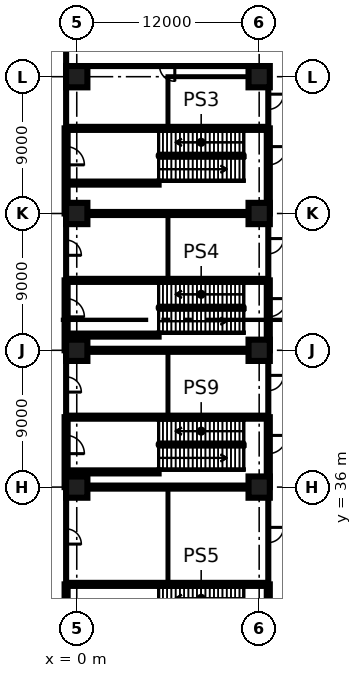
"""IFC4 building model, lengths in metres.
Left out: names, types, materials, properties, quantities, classifications, styles, units other than length and angle.
Written with IfcOpenShell. Run it as: python <this file> out.ifc"""

import sys

from ifc_helpers import new_model, si_unit, direction, frame, frame_2d, origin, origin_2d, place, context, subcontext, project, spatial, rectangle, extrude, element, fill, save


model = new_model("IFC4")
c1 = context("Model", 3, precision=1e-05, world=origin(), true_north=direction((0.0, 1.0)))
c2 = subcontext(c1, "Body", "Model", "MODEL_VIEW")
j1 = project(units=[si_unit("LENGTHUNIT", "METRE"), si_unit("PLANEANGLEUNIT", "RADIAN")], contexts=[c1])
p1 = place(None, origin())
s1 = spatial("IfcSite", under=j1, at=p1, CompositionType="ELEMENT")
p2 = place(p1, origin())
s2 = spatial("IfcBuilding", under=s1, at=p2, CompositionType="ELEMENT")
p3 = place(p2, origin())
s3 = spatial("IfcBuildingStorey", under=s2, at=p3, CompositionType="ELEMENT", Elevation=0.0)
for number, where, z_axis, x_axis in (
    (1, (0.0, 36.0, 0.0), (0.0, 0.0, 1.0), (1.0, 0.0, 0.0)),
    (2, (12.0, 36.0, 0.0), (0.0, 0.0, 1.0), (1.0, 0.0, 0.0)),
    (3, (0.0, 45.0, 0.0), (0.0, 0.0, 1.0), (1.0, 0.0, 0.0)),
    (4, (12.0, 45.0, 0.0), (0.0, 0.0, 1.0), (1.0, 0.0, 0.0)),
    (5, (0.0, 54.0, 0.0), (0.0, 0.0, 1.0), (1.0, 0.0, 0.0)),
    (6, (12.0, 54.0, 0.0), (0.0, 0.0, 1.0), (1.0, 0.0, 0.0)),
    (7, (0.0, 63.0, 0.0), (0.0, 0.0, 1.0), (1.0, 0.0, 0.0)),
    (8, (12.0, 63.0, 0.0), (0.0, 0.0, 1.0), (1.0, 0.0, 0.0)),
):
    element("IfcColumn", number, at=place(p3, frame(where, z_axis=z_axis, x_axis=x_axis)), inside=s3, PredefinedType="COLUMN", context=c2, shape_type="SweptSolid", body=[
        extrude(rectangle(XDim=1.4, YDim=1.4, at=origin_2d()), origin(), (0.0, 0.0, 1.0), 7.2),
    ])
p4 = place(p3, frame((-0.7, 23.0, 0.0), z_axis=(0.0, 0.0, 1.0), x_axis=(0.0, 1.0, 0.0)))
e9 = element("IfcWall", 9, at=p4, inside=s3, PredefinedType="SOLIDWALL", context=c2, shape_type="SweptSolid", body=[
    extrude(rectangle(XDim=6.6, YDim=0.2, at=frame_2d((3.3, 0.0))), origin(), (0.0, 0.0, 1.0), 6.8),
])
p5 = place(p4, frame((4.2, 0.0, 0.0)))
e10 = element("IfcOpeningElement", 10, at=p5, cuts=e9, PredefinedType="OPENING", context=c2, shape_type="SweptSolid", body=[
    extrude(rectangle(XDim=1.2, YDim=2.1, at=frame_2d((0.6, 1.05))), frame((0.0, 0.11, 0.0), z_axis=(0.0, -1.0, 0.0), x_axis=(1.0, 0.0, 0.0)), (0.0, 0.0, 1.0), 0.22),
])
p6 = place(p3, frame((-0.7, 29.6, 0.0), z_axis=(0.0, 0.0, 1.0), x_axis=(0.0, 1.0, 0.0)))
e11 = element("IfcWall", 11, at=p6, inside=s3, PredefinedType="PARTITIONING", context=c2, shape_type="SweptSolid", body=[
    extrude(rectangle(XDim=6.4, YDim=0.2, at=frame_2d((3.2, 0.0))), origin(), (0.0, 0.0, 1.0), 6.8),
])
p7 = place(p6, frame((2.65, 0.0, 0.0)))
e12 = element("IfcOpeningElement", 12, at=p7, cuts=e11, PredefinedType="OPENING", context=c2, shape_type="SweptSolid", body=[
    extrude(rectangle(XDim=1.0, YDim=2.1, at=frame_2d((0.5, 1.05))), frame((0.0, 0.11, 0.0), z_axis=(0.0, -1.0, 0.0), x_axis=(1.0, 0.0, 0.0)), (0.0, 0.0, 1.0), 0.22),
])
p8 = place(p3, frame((-0.7, 36.0, 0.0), z_axis=(0.0, 0.0, 1.0), x_axis=(0.0, 1.0, 0.0)))
e13 = element("IfcWall", 13, at=p8, inside=s3, PredefinedType="SOLIDWALL", context=c2, shape_type="SweptSolid", body=[
    extrude(rectangle(XDim=4.6, YDim=0.2, at=frame_2d((2.3, 0.0))), origin(), (0.0, 0.0, 1.0), 6.8),
])
p9 = place(p8, frame((2.2, 0.0, 0.0)))
e14 = element("IfcOpeningElement", 14, at=p9, cuts=e13, PredefinedType="OPENING", context=c2, shape_type="SweptSolid", body=[
    extrude(rectangle(XDim=1.2, YDim=2.1, at=frame_2d((0.6, 1.05))), frame((0.0, 0.11, 0.0), z_axis=(0.0, -1.0, 0.0), x_axis=(1.0, 0.0, 0.0)), (0.0, 0.0, 1.0), 0.22),
])
p10 = place(p3, frame((-0.7, 40.6, 0.0), z_axis=(0.0, 0.0, 1.0), x_axis=(0.0, 1.0, 0.0)))
e15 = element("IfcWall", 15, at=p10, inside=s3, PredefinedType="PARTITIONING", context=c2, shape_type="SweptSolid", body=[
    extrude(rectangle(XDim=4.4, YDim=0.2, at=frame_2d((2.2, 0.0))), origin(), (0.0, 0.0, 1.0), 6.8),
])
p11 = place(p10, frame((1.65, 0.0, 0.0)))
e16 = element("IfcOpeningElement", 16, at=p11, cuts=e15, PredefinedType="OPENING", context=c2, shape_type="SweptSolid", body=[
    extrude(rectangle(XDim=1.0, YDim=2.1, at=frame_2d((0.5, 1.05))), frame((0.0, 0.11, 0.0), z_axis=(0.0, -1.0, 0.0), x_axis=(1.0, 0.0, 0.0)), (0.0, 0.0, 1.0), 0.22),
])
p12 = place(p3, frame((-0.7, 45.0, 0.0), z_axis=(0.0, 0.0, 1.0), x_axis=(0.0, 1.0, 0.0)))
e17 = element("IfcWall", 17, at=p12, inside=s3, PredefinedType="SOLIDWALL", context=c2, shape_type="SweptSolid", body=[
    extrude(rectangle(XDim=4.6, YDim=0.2, at=frame_2d((2.3, 0.0))), origin(), (0.0, 0.0, 1.0), 6.8),
])
p13 = place(p12, frame((2.2, 0.0, 0.0)))
e18 = element("IfcOpeningElement", 18, at=p13, cuts=e17, PredefinedType="OPENING", context=c2, shape_type="SweptSolid", body=[
    extrude(rectangle(XDim=1.2, YDim=2.1, at=frame_2d((0.6, 1.05))), frame((0.0, 0.11, 0.0), z_axis=(0.0, -1.0, 0.0), x_axis=(1.0, 0.0, 0.0)), (0.0, 0.0, 1.0), 0.22),
])
p14 = place(p3, frame((-0.7, 49.6, 0.0), z_axis=(0.0, 0.0, 1.0), x_axis=(0.0, 1.0, 0.0)))
e19 = element("IfcWall", 19, at=p14, inside=s3, PredefinedType="PARTITIONING", context=c2, shape_type="SweptSolid", body=[
    extrude(rectangle(XDim=4.4, YDim=0.2, at=frame_2d((2.2, 0.0))), origin(), (0.0, 0.0, 1.0), 6.8),
])
p15 = place(p14, frame((1.65, 0.0, 0.0)))
e20 = element("IfcOpeningElement", 20, at=p15, cuts=e19, PredefinedType="OPENING", context=c2, shape_type="SweptSolid", body=[
    extrude(rectangle(XDim=1.0, YDim=2.1, at=frame_2d((0.5, 1.05))), frame((0.0, 0.11, 0.0), z_axis=(0.0, -1.0, 0.0), x_axis=(1.0, 0.0, 0.0)), (0.0, 0.0, 1.0), 0.22),
])
p16 = place(p3, frame((-0.7, 54.0, 0.0), z_axis=(0.0, 0.0, 1.0), x_axis=(0.0, 1.0, 0.0)))
e21 = element("IfcWall", 21, at=p16, inside=s3, PredefinedType="SOLIDWALL", context=c2, shape_type="SweptSolid", body=[
    extrude(rectangle(XDim=5.6, YDim=0.2, at=frame_2d((2.8, 0.0))), origin(), (0.0, 0.0, 1.0), 6.8),
])
p17 = place(p16, frame((3.2, 0.0, 0.0)))
e22 = element("IfcOpeningElement", 22, at=p17, cuts=e21, PredefinedType="OPENING", context=c2, shape_type="SweptSolid", body=[
    extrude(rectangle(XDim=1.2, YDim=2.1, at=frame_2d((0.6, 1.05))), frame((0.0, 0.11, 0.0), z_axis=(0.0, -1.0, 0.0), x_axis=(1.0, 0.0, 0.0)), (0.0, 0.0, 1.0), 0.22),
])
p18 = place(p3, frame((-0.7, 59.6, 0.0), z_axis=(0.0, 0.0, 1.0), x_axis=(0.0, 1.0, 0.0)))
e23 = element("IfcWall", 23, at=p18, inside=s3, PredefinedType="PARTITIONING", context=c2, shape_type="SweptSolid", body=[
    extrude(rectangle(XDim=6.4, YDim=0.2, at=frame_2d((3.2, 0.0))), origin(), (0.0, 0.0, 1.0), 6.8),
])
for number, where, z_axis, x_axis in (
    (24, (-0.6, 29.6, 0.0), (0.0, 0.0, 1.0), (1.0, 0.0, 0.0)),
    (25, (-0.6, 36.0, 0.0), (0.0, 0.0, 1.0), (1.0, 0.0, 0.0)),
    (26, (-0.6, 40.6, 0.0), (0.0, 0.0, 1.0), (1.0, 0.0, 0.0)),
    (27, (-0.6, 45.0, 0.0), (0.0, 0.0, 1.0), (1.0, 0.0, 0.0)),
    (28, (-0.6, 49.6, 0.0), (0.0, 0.0, 1.0), (1.0, 0.0, 0.0)),
    (29, (-0.6, 54.0, 0.0), (0.0, 0.0, 1.0), (1.0, 0.0, 0.0)),
    (30, (-0.6, 59.6, 0.0), (0.0, 0.0, 1.0), (1.0, 0.0, 0.0)),
):
    element("IfcWall", number, at=place(p3, frame(where, z_axis=z_axis, x_axis=x_axis)), inside=s3, PredefinedType="SOLIDWALL", context=c2, shape_type="SweptSolid", body=[
        extrude(rectangle(XDim=13.1, YDim=0.2, at=frame_2d((6.55, 0.0))), origin(), (0.0, 0.0, 1.0), 6.8),
    ])
p19 = place(p3, frame((-0.6, 63.7, 0.0), z_axis=(0.0, 0.0, 1.0), x_axis=(1.0, 0.0, 0.0)))
e31 = element("IfcWall", 31, at=p19, inside=s3, PredefinedType="PARTITIONING", context=c2, shape_type="SweptSolid", body=[
    extrude(rectangle(XDim=13.3, YDim=0.2, at=frame_2d((6.65, 0.0))), origin(), (0.0, 0.0, 1.0), 6.8),
])
p20 = place(p19, frame((6.05, 0.0, 0.0)))
e32 = element("IfcOpeningElement", 32, at=p20, cuts=e31, PredefinedType="OPENING", context=c2, shape_type="SweptSolid", body=[
    extrude(rectangle(XDim=1.0, YDim=2.1, at=frame_2d((0.5, 1.05))), frame((0.0, 0.11, 0.0), z_axis=(0.0, -1.0, 0.0), x_axis=(1.0, 0.0, 0.0)), (0.0, 0.0, 1.0), 0.22),
])
p21 = place(p3, frame((5.938, 63.0, 0.0), z_axis=(0.0, 0.0, 1.0), x_axis=(1.0, 0.0, 0.0)))
e33 = element("IfcWall", 33, at=p21, inside=s3, PredefinedType="PARTITIONING", context=c2, shape_type="SweptSolid", body=[
    extrude(rectangle(XDim=6.562, YDim=0.125, at=frame_2d((3.281, 0.0))), origin(), (0.0, 0.0, 1.0), 6.8),
])
p22 = place(p3, frame((6.0, 29.7, 0.0), z_axis=(0.0, 0.0, 1.0), x_axis=(0.0, 1.0, 0.0)))
e34 = element("IfcWall", 34, at=p22, inside=s3, PredefinedType="PARTITIONING", context=c2, shape_type="SweptSolid", body=[
    extrude(rectangle(XDim=6.2, YDim=0.125, at=frame_2d((3.1, 0.0))), origin(), (0.0, 0.0, 1.0), 6.8),
])
for number, where, z_axis, x_axis in (
    (35, (6.0, 40.7, 0.0), (0.0, 0.0, 1.0), (0.0, 1.0, 0.0)),
    (36, (6.0, 49.7, 0.0), (0.0, 0.0, 1.0), (0.0, 1.0, 0.0)),
):
    element("IfcWall", number, at=place(p3, frame(where, z_axis=z_axis, x_axis=x_axis)), inside=s3, PredefinedType="PARTITIONING", context=c2, shape_type="SweptSolid", body=[
        extrude(rectangle(XDim=4.2, YDim=0.125, at=frame_2d((2.1, 0.0))), origin(), (0.0, 0.0, 1.0), 6.8),
    ])
p23 = place(p3, frame((6.0, 59.7, 0.0), z_axis=(0.0, 0.0, 1.0), x_axis=(0.0, 1.0, 0.0)))
e37 = element("IfcWall", 37, at=p23, inside=s3, PredefinedType="PARTITIONING", context=c2, shape_type="SweptSolid", body=[
    extrude(rectangle(XDim=3.238, YDim=0.125, at=frame_2d((1.619, 0.0))), origin(), (0.0, 0.0, 1.0), 6.8),
])
p24 = place(p3, frame((12.6, 23.1, 0.0), z_axis=(0.0, 0.0, 1.0), x_axis=(0.0, 1.0, 0.0)))
e38 = element("IfcWall", 38, at=p24, inside=s3, PredefinedType="SOLIDWALL", context=c2, shape_type="SweptSolid", body=[
    extrude(rectangle(XDim=6.5, YDim=0.2, at=frame_2d((3.25, 0.0))), origin(), (0.0, 0.0, 1.0), 6.8),
])
p25 = place(p24, frame((4.1, 0.0, 0.0)))
e39 = element("IfcOpeningElement", 39, at=p25, cuts=e38, PredefinedType="OPENING", context=c2, shape_type="SweptSolid", body=[
    extrude(rectangle(XDim=1.2, YDim=2.1, at=frame_2d((0.6, 1.05))), frame((0.0, 0.11, 0.0), z_axis=(0.0, -1.0, 0.0), x_axis=(1.0, 0.0, 0.0)), (0.0, 0.0, 1.0), 0.22),
])
p26 = place(p3, frame((12.6, 29.6, 0.0), z_axis=(0.0, 0.0, 1.0), x_axis=(0.0, 1.0, 0.0)))
e40 = element("IfcWall", 40, at=p26, inside=s3, PredefinedType="PARTITIONING", context=c2, shape_type="SweptSolid", body=[
    extrude(rectangle(XDim=6.4, YDim=0.2, at=frame_2d((3.2, 0.0))), origin(), (0.0, 0.0, 1.0), 6.8),
])
p27 = place(p26, frame((2.75, 0.0, 0.0)))
e41 = element("IfcOpeningElement", 41, at=p27, cuts=e40, PredefinedType="OPENING", context=c2, shape_type="SweptSolid", body=[
    extrude(rectangle(XDim=1.0, YDim=2.1, at=frame_2d((0.5, 1.05))), frame((0.0, 0.11, 0.0), z_axis=(0.0, -1.0, 0.0), x_axis=(1.0, 0.0, 0.0)), (0.0, 0.0, 1.0), 0.22),
])
p28 = place(p3, frame((12.6, 36.0, 0.0), z_axis=(0.0, 0.0, 1.0), x_axis=(0.0, 1.0, 0.0)))
e42 = element("IfcWall", 42, at=p28, inside=s3, PredefinedType="SOLIDWALL", context=c2, shape_type="SweptSolid", body=[
    extrude(rectangle(XDim=4.6, YDim=0.2, at=frame_2d((2.3, 0.0))), origin(), (0.0, 0.0, 1.0), 6.8),
])
p29 = place(p28, frame((2.2, 0.0, 0.0)))
e43 = element("IfcOpeningElement", 43, at=p29, cuts=e42, PredefinedType="OPENING", context=c2, shape_type="SweptSolid", body=[
    extrude(rectangle(XDim=1.2, YDim=2.1, at=frame_2d((0.6, 1.05))), frame((0.0, 0.11, 0.0), z_axis=(0.0, -1.0, 0.0), x_axis=(1.0, 0.0, 0.0)), (0.0, 0.0, 1.0), 0.22),
])
p30 = place(p3, frame((12.6, 40.6, 0.0), z_axis=(0.0, 0.0, 1.0), x_axis=(0.0, 1.0, 0.0)))
e44 = element("IfcWall", 44, at=p30, inside=s3, PredefinedType="PARTITIONING", context=c2, shape_type="SweptSolid", body=[
    extrude(rectangle(XDim=4.4, YDim=0.2, at=frame_2d((2.2, 0.0))), origin(), (0.0, 0.0, 1.0), 6.8),
])
p31 = place(p30, frame((1.75, 0.0, 0.0)))
e45 = element("IfcOpeningElement", 45, at=p31, cuts=e44, PredefinedType="OPENING", context=c2, shape_type="SweptSolid", body=[
    extrude(rectangle(XDim=1.0, YDim=2.1, at=frame_2d((0.5, 1.05))), frame((0.0, 0.11, 0.0), z_axis=(0.0, -1.0, 0.0), x_axis=(1.0, 0.0, 0.0)), (0.0, 0.0, 1.0), 0.22),
])
p32 = place(p3, frame((12.6, 45.0, 0.0), z_axis=(0.0, 0.0, 1.0), x_axis=(0.0, 1.0, 0.0)))
e46 = element("IfcWall", 46, at=p32, inside=s3, PredefinedType="SOLIDWALL", context=c2, shape_type="SweptSolid", body=[
    extrude(rectangle(XDim=4.6, YDim=0.2, at=frame_2d((2.3, 0.0))), origin(), (0.0, 0.0, 1.0), 6.8),
])
p33 = place(p32, frame((2.2, 0.0, 0.0)))
e47 = element("IfcOpeningElement", 47, at=p33, cuts=e46, PredefinedType="OPENING", context=c2, shape_type="SweptSolid", body=[
    extrude(rectangle(XDim=1.2, YDim=2.1, at=frame_2d((0.6, 1.05))), frame((0.0, 0.11, 0.0), z_axis=(0.0, -1.0, 0.0), x_axis=(1.0, 0.0, 0.0)), (0.0, 0.0, 1.0), 0.22),
])
p34 = place(p3, frame((12.6, 49.6, 0.0), z_axis=(0.0, 0.0, 1.0), x_axis=(0.0, 1.0, 0.0)))
e48 = element("IfcWall", 48, at=p34, inside=s3, PredefinedType="PARTITIONING", context=c2, shape_type="SweptSolid", body=[
    extrude(rectangle(XDim=4.4, YDim=0.2, at=frame_2d((2.2, 0.0))), origin(), (0.0, 0.0, 1.0), 6.8),
])
p35 = place(p34, frame((1.75, 0.0, 0.0)))
e49 = element("IfcOpeningElement", 49, at=p35, cuts=e48, PredefinedType="OPENING", context=c2, shape_type="SweptSolid", body=[
    extrude(rectangle(XDim=1.0, YDim=2.1, at=frame_2d((0.5, 1.05))), frame((0.0, 0.11, 0.0), z_axis=(0.0, -1.0, 0.0), x_axis=(1.0, 0.0, 0.0)), (0.0, 0.0, 1.0), 0.22),
])
p36 = place(p3, frame((12.6, 54.0, 0.0), z_axis=(0.0, 0.0, 1.0), x_axis=(0.0, 1.0, 0.0)))
e50 = element("IfcWall", 50, at=p36, inside=s3, PredefinedType="SOLIDWALL", context=c2, shape_type="SweptSolid", body=[
    extrude(rectangle(XDim=5.6, YDim=0.2, at=frame_2d((2.8, 0.0))), origin(), (0.0, 0.0, 1.0), 6.8),
])
p37 = place(p36, frame((3.2, 0.0, 0.0)))
e51 = element("IfcOpeningElement", 51, at=p37, cuts=e50, PredefinedType="OPENING", context=c2, shape_type="SweptSolid", body=[
    extrude(rectangle(XDim=1.2, YDim=2.1, at=frame_2d((0.6, 1.05))), frame((0.0, 0.11, 0.0), z_axis=(0.0, -1.0, 0.0), x_axis=(1.0, 0.0, 0.0)), (0.0, 0.0, 1.0), 0.22),
])
p38 = place(p3, frame((12.6, 59.6, 0.0), z_axis=(0.0, 0.0, 1.0), x_axis=(0.0, 1.0, 0.0)))
e52 = element("IfcWall", 52, at=p38, inside=s3, PredefinedType="PARTITIONING", context=c2, shape_type="SweptSolid", body=[
    extrude(rectangle(XDim=4.0, YDim=0.2, at=frame_2d((2.0, 0.0))), origin(), (0.0, 0.0, 1.0), 6.8),
])
p39 = place(p38, frame((1.25, 0.0, 0.0)))
e53 = element("IfcOpeningElement", 53, at=p39, cuts=e52, PredefinedType="OPENING", context=c2, shape_type="SweptSolid", body=[
    extrude(rectangle(XDim=1.0, YDim=2.1, at=frame_2d((0.5, 1.05))), frame((0.0, 0.11, 0.0), z_axis=(0.0, -1.0, 0.0), x_axis=(1.0, 0.0, 0.0)), (0.0, 0.0, 1.0), 0.22),
])
for number, where, z_axis, x_axis in (
    (54, (-0.6, 56.0, 0.0), (0.0, 0.0, 1.0), (1.0, 0.0, 0.0)),
    (55, (-0.6, 46.0, 0.0), (0.0, 0.0, 1.0), (1.0, 0.0, 0.0)),
    (56, (-0.6, 37.0, 0.0), (0.0, 0.0, 1.0), (1.0, 0.0, 0.0)),
):
    element("IfcWall", number, at=place(p3, frame(where, z_axis=z_axis, x_axis=x_axis)), inside=s3, PredefinedType="SOLIDWALL", context=c2, shape_type="SweptSolid", body=[
        extrude(rectangle(XDim=5.985, YDim=0.2, at=frame_2d((2.993, 0.0))), origin(), (0.0, 0.0, 1.0), 6.8),
    ])
p40 = place(p27, origin())
e57 = element("IfcDoor", 57, at=p40, inside=s3, OperationType="SINGLE_SWING_RIGHT", PredefinedType="DOOR", context=c2, shape_type="SweptSolid", body=[
    extrude(rectangle(XDim=1.0, YDim=2.1, at=frame_2d((0.5, 1.05))), frame((0.0, 0.025, 0.0), z_axis=(0.0, -1.0, 0.0), x_axis=(1.0, 0.0, 0.0)), (0.0, 0.0, 1.0), 0.05),
])
fill(e41, e57)
p41 = place(p31, origin())
e58 = element("IfcDoor", 58, at=p41, inside=s3, OperationType="SINGLE_SWING_RIGHT", PredefinedType="DOOR", context=c2, shape_type="SweptSolid", body=[
    extrude(rectangle(XDim=1.0, YDim=2.1, at=frame_2d((0.5, 1.05))), frame((0.0, 0.025, 0.0), z_axis=(0.0, -1.0, 0.0), x_axis=(1.0, 0.0, 0.0)), (0.0, 0.0, 1.0), 0.05),
])
fill(e45, e58)
p42 = place(p35, origin())
e59 = element("IfcDoor", 59, at=p42, inside=s3, OperationType="SINGLE_SWING_RIGHT", PredefinedType="DOOR", context=c2, shape_type="SweptSolid", body=[
    extrude(rectangle(XDim=1.0, YDim=2.1, at=frame_2d((0.5, 1.05))), frame((0.0, 0.025, 0.0), z_axis=(0.0, -1.0, 0.0), x_axis=(1.0, 0.0, 0.0)), (0.0, 0.0, 1.0), 0.05),
])
fill(e49, e59)
p43 = place(p39, origin())
e60 = element("IfcDoor", 60, at=p43, inside=s3, OperationType="SINGLE_SWING_RIGHT", PredefinedType="DOOR", context=c2, shape_type="SweptSolid", body=[
    extrude(rectangle(XDim=1.0, YDim=2.1, at=frame_2d((0.5, 1.05))), frame((0.0, 0.025, 0.0), z_axis=(0.0, -1.0, 0.0), x_axis=(1.0, 0.0, 0.0)), (0.0, 0.0, 1.0), 0.05),
])
fill(e53, e60)
p44 = place(p7, frame((1.0, 0.0, 0.0), z_axis=(0.0, 0.0, 1.0), x_axis=(-1.0, 0.0, 0.0)))
e61 = element("IfcDoor", 61, at=p44, inside=s3, OperationType="SINGLE_SWING_LEFT", PredefinedType="DOOR", context=c2, shape_type="SweptSolid", body=[
    extrude(rectangle(XDim=1.0, YDim=2.1, at=frame_2d((0.5, 1.05))), frame((0.0, 0.025, 0.0), z_axis=(0.0, -1.0, 0.0), x_axis=(1.0, 0.0, 0.0)), (0.0, 0.0, 1.0), 0.05),
])
fill(e12, e61)
p45 = place(p11, frame((1.0, 0.0, 0.0), z_axis=(0.0, 0.0, 1.0), x_axis=(-1.0, 0.0, 0.0)))
e62 = element("IfcDoor", 62, at=p45, inside=s3, OperationType="SINGLE_SWING_LEFT", PredefinedType="DOOR", context=c2, shape_type="SweptSolid", body=[
    extrude(rectangle(XDim=1.0, YDim=2.1, at=frame_2d((0.5, 1.05))), frame((0.0, 0.025, 0.0), z_axis=(0.0, -1.0, 0.0), x_axis=(1.0, 0.0, 0.0)), (0.0, 0.0, 1.0), 0.05),
])
fill(e16, e62)
p46 = place(p15, frame((1.0, 0.0, 0.0), z_axis=(0.0, 0.0, 1.0), x_axis=(-1.0, 0.0, 0.0)))
e63 = element("IfcDoor", 63, at=p46, inside=s3, OperationType="SINGLE_SWING_LEFT", PredefinedType="DOOR", context=c2, shape_type="SweptSolid", body=[
    extrude(rectangle(XDim=1.0, YDim=2.1, at=frame_2d((0.5, 1.05))), frame((0.0, 0.025, 0.0), z_axis=(0.0, -1.0, 0.0), x_axis=(1.0, 0.0, 0.0)), (0.0, 0.0, 1.0), 0.05),
])
fill(e20, e63)
p47 = place(p20, origin())
e64 = element("IfcDoor", 64, at=p47, inside=s3, OperationType="SINGLE_SWING_RIGHT", PredefinedType="DOOR", context=c2, shape_type="SweptSolid", body=[
    extrude(rectangle(XDim=1.0, YDim=2.1, at=frame_2d((0.5, 1.05))), frame((0.0, 0.025, 0.0), z_axis=(0.0, -1.0, 0.0), x_axis=(1.0, 0.0, 0.0)), (0.0, 0.0, 1.0), 0.05),
])
fill(e32, e64)
p48 = place(p37, origin())
e65 = element("IfcDoor", 65, at=p48, inside=s3, OperationType="SINGLE_SWING_RIGHT", PredefinedType="DOOR", context=c2, shape_type="SweptSolid", body=[
    extrude(rectangle(XDim=1.2, YDim=2.1, at=frame_2d((0.6, 1.05))), frame((0.0, 0.025, 0.0), z_axis=(0.0, -1.0, 0.0), x_axis=(1.0, 0.0, 0.0)), (0.0, 0.0, 1.0), 0.05),
])
fill(e51, e65)
p49 = place(p17, frame((1.2, 0.0, 0.0), z_axis=(0.0, 0.0, 1.0), x_axis=(-1.0, 0.0, 0.0)))
e66 = element("IfcDoor", 66, at=p49, inside=s3, OperationType="SINGLE_SWING_LEFT", PredefinedType="DOOR", context=c2, shape_type="SweptSolid", body=[
    extrude(rectangle(XDim=1.2, YDim=2.1, at=frame_2d((0.6, 1.05))), frame((0.0, 0.025, 0.0), z_axis=(0.0, -1.0, 0.0), x_axis=(1.0, 0.0, 0.0)), (0.0, 0.0, 1.0), 0.05),
])
fill(e22, e66)
p50 = place(p33, origin())
e67 = element("IfcDoor", 67, at=p50, inside=s3, OperationType="SINGLE_SWING_RIGHT", PredefinedType="DOOR", context=c2, shape_type="SweptSolid", body=[
    extrude(rectangle(XDim=1.2, YDim=2.1, at=frame_2d((0.6, 1.05))), frame((0.0, 0.025, 0.0), z_axis=(0.0, -1.0, 0.0), x_axis=(1.0, 0.0, 0.0)), (0.0, 0.0, 1.0), 0.05),
])
fill(e47, e67)
p51 = place(p13, frame((1.2, 0.0, 0.0), z_axis=(0.0, 0.0, 1.0), x_axis=(-1.0, 0.0, 0.0)))
e68 = element("IfcDoor", 68, at=p51, inside=s3, OperationType="SINGLE_SWING_LEFT", PredefinedType="DOOR", context=c2, shape_type="SweptSolid", body=[
    extrude(rectangle(XDim=1.2, YDim=2.1, at=frame_2d((0.6, 1.05))), frame((0.0, 0.025, 0.0), z_axis=(0.0, -1.0, 0.0), x_axis=(1.0, 0.0, 0.0)), (0.0, 0.0, 1.0), 0.05),
])
fill(e18, e68)
p52 = place(p29, origin())
e69 = element("IfcDoor", 69, at=p52, inside=s3, OperationType="SINGLE_SWING_RIGHT", PredefinedType="DOOR", context=c2, shape_type="SweptSolid", body=[
    extrude(rectangle(XDim=1.2, YDim=2.1, at=frame_2d((0.6, 1.05))), frame((0.0, 0.025, 0.0), z_axis=(0.0, -1.0, 0.0), x_axis=(1.0, 0.0, 0.0)), (0.0, 0.0, 1.0), 0.05),
])
fill(e43, e69)
p53 = place(p9, frame((1.2, 0.0, 0.0), z_axis=(0.0, 0.0, 1.0), x_axis=(-1.0, 0.0, 0.0)))
e70 = element("IfcDoor", 70, at=p53, inside=s3, OperationType="SINGLE_SWING_LEFT", PredefinedType="DOOR", context=c2, shape_type="SweptSolid", body=[
    extrude(rectangle(XDim=1.2, YDim=2.1, at=frame_2d((0.6, 1.05))), frame((0.0, 0.025, 0.0), z_axis=(0.0, -1.0, 0.0), x_axis=(1.0, 0.0, 0.0)), (0.0, 0.0, 1.0), 0.05),
])
fill(e14, e70)
save(model, sys.argv[1])
